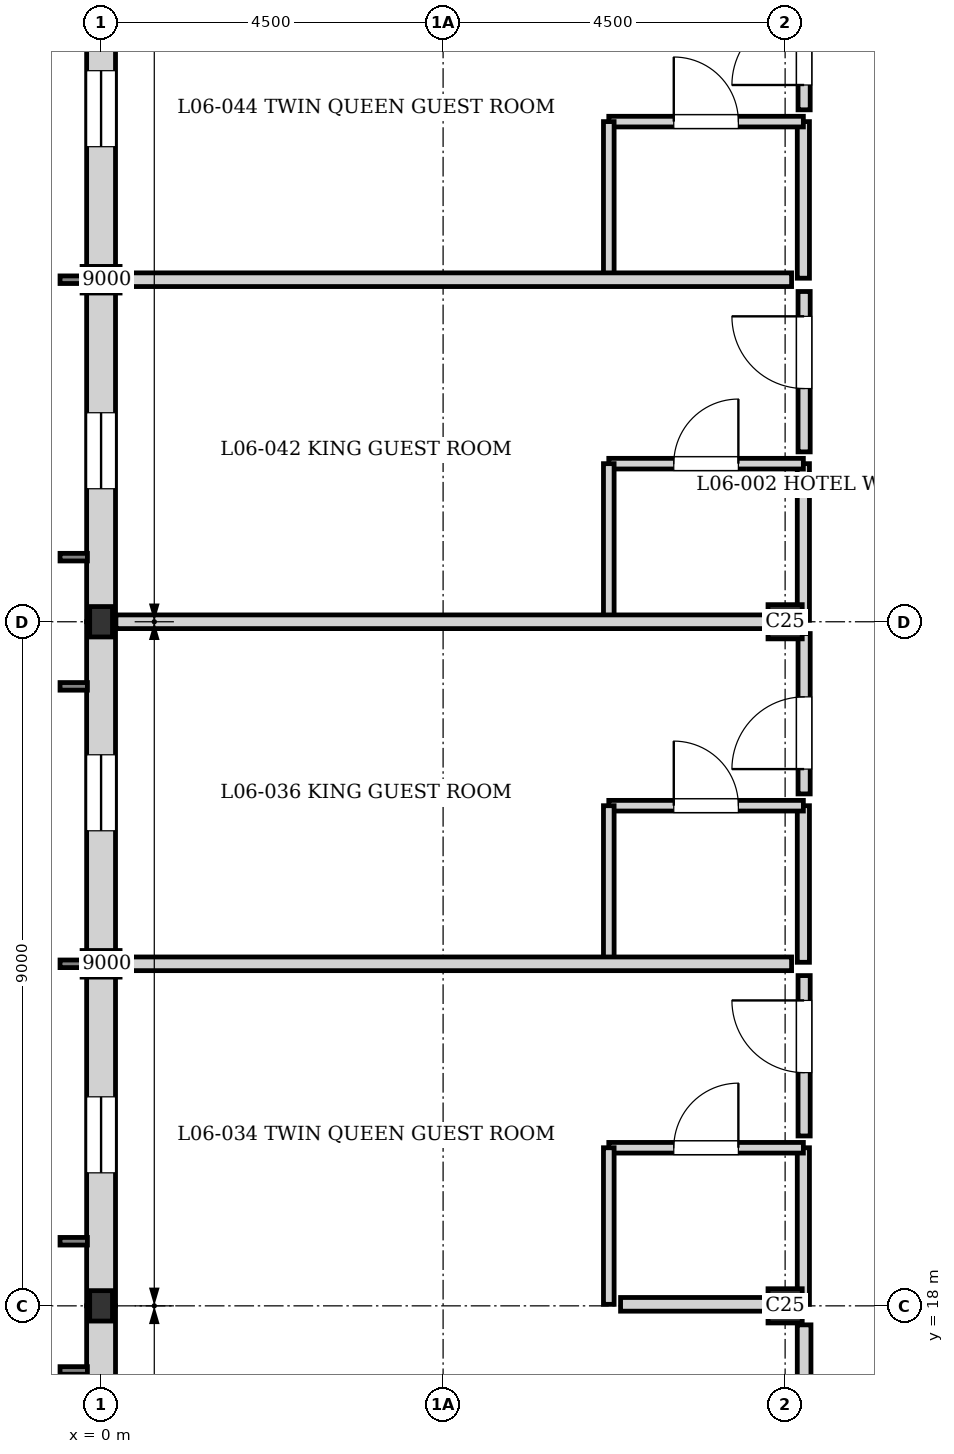
"""IFC4 building model, lengths in metres.
Left out: names, types, materials, properties, quantities, classifications, styles, units other than length and angle.
Written with IfcOpenShell. Run it as: python <this file> out.ifc"""

import sys

from ifc_helpers import new_model, si_unit, direction, frame, frame_2d, origin, origin_2d, place, context, subcontext, project, spatial, rectangle, i_section, extrude, element, fill, save


model = new_model("IFC4")
c1 = context("Model", 3, precision=1e-05, world=origin(), true_north=direction((0.0, 1.0)))
c2 = subcontext(c1, "Body", "Model", "MODEL_VIEW")
j1 = project(units=[si_unit("LENGTHUNIT", "METRE"), si_unit("PLANEANGLEUNIT", "RADIAN")], contexts=[c1])
p1 = place(None, origin())
s1 = spatial("IfcSite", under=j1, at=p1, CompositionType="ELEMENT")
p2 = place(p1, origin())
s2 = spatial("IfcBuilding", under=s1, at=p2, CompositionType="ELEMENT")
p3 = place(p2, frame((0.0, 0.0, 20.64)))
s3 = spatial("IfcBuildingStorey", under=s2, at=p3, CompositionType="ELEMENT", Elevation=20.64)
for number, where, z_axis, x_axis in (
    (1, (0.0, 18.0, 0.0), (0.0, 0.0, 1.0), (1.0, 0.0, 0.0)),
    (2, (0.0, 27.0, 0.0), (0.0, 0.0, 1.0), (1.0, 0.0, 0.0)),
):
    element("IfcColumn", number, at=place(p3, frame(where, z_axis=z_axis, x_axis=x_axis)), inside=s3, PredefinedType="COLUMN", context=c2, shape_type="SweptSolid", body=[
        extrude(i_section(OverallWidth=0.3, OverallDepth=0.4, WebThickness=0.013, FlangeThickness=0.024, at=origin_2d()), origin(), (0.0, 0.0, 1.0), 3.04),
    ])
for number, where, z_axis, x_axis in (
    (3, (9.0, 18.0, 0.0), (0.0, 0.0, 1.0), (1.0, 0.0, 0.0)),
    (4, (9.0, 27.0, 0.0), (0.0, 0.0, 1.0), (1.0, 0.0, 0.0)),
):
    element("IfcColumn", number, at=place(p3, frame(where, z_axis=z_axis, x_axis=x_axis)), inside=s3, PredefinedType="COLUMN", context=c2, shape_type="SweptSolid", body=[
        extrude(rectangle(XDim=0.45, YDim=0.45, at=origin_2d()), origin(), (0.0, 0.0, 1.0), 3.04),
    ])
for number, where, z_axis, x_axis in (
    (5, (0.0, 22.5, 0.0), (0.0, 0.0, 1.0), (0.0, 1.0, 0.0)),
    (6, (0.0, 31.5, 0.0), (0.0, 0.0, 1.0), (0.0, 1.0, 0.0)),
):
    element("IfcColumn", number, at=place(p3, frame(where, z_axis=z_axis, x_axis=x_axis)), inside=s3, PredefinedType="PILASTER", context=c2, shape_type="SweptSolid", body=[
        extrude(rectangle(XDim=0.35, YDim=0.5, at=origin_2d()), origin(), (0.0, 0.0, 1.0), 3.04),
    ])
p4 = place(p3, frame((0.0, 9.0, 0.0), z_axis=(0.0, 0.0, 1.0), x_axis=(0.0, 1.0, 0.0)))
e7 = element("IfcWall", 7, at=p4, inside=s3, PredefinedType="SOLIDWALL", context=c2, shape_type="SweptSolid", body=[
    extrude(rectangle(XDim=9.0, YDim=0.38, at=frame_2d((4.5, 0.0))), origin(), (0.0, 0.0, 1.0), 2.42),
])
p5 = place(p4, frame((1.75, 0.0, 0.35)))
e8 = element("IfcOpeningElement", 8, at=p5, cuts=e7, PredefinedType="OPENING", context=c2, shape_type="SweptSolid", body=[
    extrude(rectangle(XDim=1.0, YDim=1.6, at=frame_2d((0.5, 0.8))), frame((0.0, 0.2, 0.0), z_axis=(0.0, -1.0, 0.0), x_axis=(1.0, 0.0, 0.0)), (0.0, 0.0, 1.0), 0.4),
])
p6 = place(p4, frame((6.25, 0.0, 0.35)))
e9 = element("IfcOpeningElement", 9, at=p6, cuts=e7, PredefinedType="OPENING", context=c2, shape_type="SweptSolid", body=[
    extrude(rectangle(XDim=1.0, YDim=1.6, at=frame_2d((0.5, 0.8))), frame((0.0, 0.2, 0.0), z_axis=(0.0, -1.0, 0.0), x_axis=(1.0, 0.0, 0.0)), (0.0, 0.0, 1.0), 0.4),
])
p7 = place(p3, frame((0.0, 18.0, 0.0), z_axis=(0.0, 0.0, 1.0), x_axis=(0.0, 1.0, 0.0)))
e10 = element("IfcWall", 10, at=p7, inside=s3, PredefinedType="SOLIDWALL", context=c2, shape_type="SweptSolid", body=[
    extrude(rectangle(XDim=9.0, YDim=0.38, at=frame_2d((4.5, 0.0))), origin(), (0.0, 0.0, 1.0), 2.38),
])
p8 = place(p7, frame((1.75, 0.0, 0.35)))
e11 = element("IfcOpeningElement", 11, at=p8, cuts=e10, PredefinedType="OPENING", context=c2, shape_type="SweptSolid", body=[
    extrude(rectangle(XDim=1.0, YDim=1.6, at=frame_2d((0.5, 0.8))), frame((0.0, 0.2, 0.0), z_axis=(0.0, -1.0, 0.0), x_axis=(1.0, 0.0, 0.0)), (0.0, 0.0, 1.0), 0.4),
])
p9 = place(p7, frame((6.25, 0.0, 0.35)))
e12 = element("IfcOpeningElement", 12, at=p9, cuts=e10, PredefinedType="OPENING", context=c2, shape_type="SweptSolid", body=[
    extrude(rectangle(XDim=1.0, YDim=1.6, at=frame_2d((0.5, 0.8))), frame((0.0, 0.2, 0.0), z_axis=(0.0, -1.0, 0.0), x_axis=(1.0, 0.0, 0.0)), (0.0, 0.0, 1.0), 0.4),
])
p10 = place(p3, frame((0.0, 27.0, 0.0), z_axis=(0.0, 0.0, 1.0), x_axis=(0.0, 1.0, 0.0)))
e13 = element("IfcWall", 13, at=p10, inside=s3, PredefinedType="SOLIDWALL", context=c2, shape_type="SweptSolid", body=[
    extrude(rectangle(XDim=8.87, YDim=0.38, at=frame_2d((4.435, 0.0))), origin(), (0.0, 0.0, 1.0), 2.82),
])
p11 = place(p10, frame((1.75, 0.0, 0.35)))
e14 = element("IfcOpeningElement", 14, at=p11, cuts=e13, PredefinedType="OPENING", context=c2, shape_type="SweptSolid", body=[
    extrude(rectangle(XDim=1.0, YDim=1.6, at=frame_2d((0.5, 0.8))), frame((0.0, 0.2, 0.0), z_axis=(0.0, -1.0, 0.0), x_axis=(1.0, 0.0, 0.0)), (0.0, 0.0, 1.0), 0.4),
])
p12 = place(p10, frame((6.25, 0.0, 0.35)))
e15 = element("IfcOpeningElement", 15, at=p12, cuts=e13, PredefinedType="OPENING", context=c2, shape_type="SweptSolid", body=[
    extrude(rectangle(XDim=1.0, YDim=1.6, at=frame_2d((0.5, 0.8))), frame((0.0, 0.2, 0.0), z_axis=(0.0, -1.0, 0.0), x_axis=(1.0, 0.0, 0.0)), (0.0, 0.0, 1.0), 0.4),
])
p13 = place(p3, frame((9.24, 18.02, 0.0), z_axis=(0.0, 0.0, 1.0), x_axis=(0.0, 1.0, 0.0)))
e16 = element("IfcWall", 16, at=p13, inside=s3, PredefinedType="PARTITIONING", context=c2, shape_type="SweptSolid", body=[
    extrude(rectangle(XDim=2.06, YDim=0.16, at=frame_2d((1.03, 0.0))), origin(), (0.0, 0.0, 1.0), 2.82),
])
p14 = place(p3, frame((6.68, 20.08, 0.0), z_axis=(0.0, 0.0, 1.0), x_axis=(1.0, 0.0, 0.0)))
e17 = element("IfcWall", 17, at=p14, inside=s3, PredefinedType="PLUMBINGWALL", context=c2, shape_type="SweptSolid", body=[
    extrude(rectangle(XDim=2.56, YDim=0.14, at=frame_2d((1.28, 0.0))), origin(), (0.0, 0.0, 1.0), 2.82),
])
p15 = place(p14, frame((0.855, 0.0, 0.0)))
e18 = element("IfcOpeningElement", 18, at=p15, cuts=e17, PredefinedType="OPENING", context=c2, shape_type="SweptSolid", body=[
    extrude(rectangle(XDim=0.85, YDim=2.04, at=frame_2d((0.425, 1.02))), frame((0.0, 0.08, 0.0), z_axis=(0.0, -1.0, 0.0), x_axis=(1.0, 0.0, 0.0)), (0.0, 0.0, 1.0), 0.16),
])
p16 = place(p3, frame((6.68, 18.02, 0.0), z_axis=(0.0, 0.0, 1.0), x_axis=(0.0, 1.0, 0.0)))
e19 = element("IfcWall", 19, at=p16, inside=s3, PredefinedType="PLUMBINGWALL", context=c2, shape_type="SweptSolid", body=[
    extrude(rectangle(XDim=2.06, YDim=0.14, at=frame_2d((1.03, 0.0))), origin(), (0.0, 0.0, 1.0), 2.82),
])
p17 = place(p3, frame((9.24, 22.52, 0.0), z_axis=(0.0, 0.0, 1.0), x_axis=(0.0, 1.0, 0.0)))
e20 = element("IfcWall", 20, at=p17, inside=s3, PredefinedType="PARTITIONING", context=c2, shape_type="SweptSolid", body=[
    extrude(rectangle(XDim=2.06, YDim=0.16, at=frame_2d((1.03, 0.0))), origin(), (0.0, 0.0, 1.0), 2.82),
])
p18 = place(p3, frame((6.68, 24.58, 0.0), z_axis=(0.0, 0.0, 1.0), x_axis=(1.0, 0.0, 0.0)))
e21 = element("IfcWall", 21, at=p18, inside=s3, PredefinedType="PLUMBINGWALL", context=c2, shape_type="SweptSolid", body=[
    extrude(rectangle(XDim=2.56, YDim=0.14, at=frame_2d((1.28, 0.0))), origin(), (0.0, 0.0, 1.0), 2.82),
])
p19 = place(p18, frame((0.855, 0.0, 0.0)))
e22 = element("IfcOpeningElement", 22, at=p19, cuts=e21, PredefinedType="OPENING", context=c2, shape_type="SweptSolid", body=[
    extrude(rectangle(XDim=0.85, YDim=2.04, at=frame_2d((0.425, 1.02))), frame((0.0, 0.08, 0.0), z_axis=(0.0, -1.0, 0.0), x_axis=(1.0, 0.0, 0.0)), (0.0, 0.0, 1.0), 0.16),
])
p20 = place(p3, frame((6.68, 22.52, 0.0), z_axis=(0.0, 0.0, 1.0), x_axis=(0.0, 1.0, 0.0)))
e23 = element("IfcWall", 23, at=p20, inside=s3, PredefinedType="PLUMBINGWALL", context=c2, shape_type="SweptSolid", body=[
    extrude(rectangle(XDim=2.06, YDim=0.14, at=frame_2d((1.03, 0.0))), origin(), (0.0, 0.0, 1.0), 2.82),
])
p21 = place(p3, frame((9.24, 27.02, 0.0), z_axis=(0.0, 0.0, 1.0), x_axis=(0.0, 1.0, 0.0)))
e24 = element("IfcWall", 24, at=p21, inside=s3, PredefinedType="PARTITIONING", context=c2, shape_type="SweptSolid", body=[
    extrude(rectangle(XDim=2.06, YDim=0.16, at=frame_2d((1.03, 0.0))), origin(), (0.0, 0.0, 1.0), 2.82),
])
p22 = place(p3, frame((6.68, 29.08, 0.0), z_axis=(0.0, 0.0, 1.0), x_axis=(1.0, 0.0, 0.0)))
e25 = element("IfcWall", 25, at=p22, inside=s3, PredefinedType="PLUMBINGWALL", context=c2, shape_type="SweptSolid", body=[
    extrude(rectangle(XDim=2.56, YDim=0.14, at=frame_2d((1.28, 0.0))), origin(), (0.0, 0.0, 1.0), 2.82),
])
p23 = place(p22, frame((0.855, 0.0, 0.0)))
e26 = element("IfcOpeningElement", 26, at=p23, cuts=e25, PredefinedType="OPENING", context=c2, shape_type="SweptSolid", body=[
    extrude(rectangle(XDim=0.85, YDim=2.04, at=frame_2d((0.425, 1.02))), frame((0.0, 0.08, 0.0), z_axis=(0.0, -1.0, 0.0), x_axis=(1.0, 0.0, 0.0)), (0.0, 0.0, 1.0), 0.16),
])
p24 = place(p3, frame((6.68, 27.02, 0.0), z_axis=(0.0, 0.0, 1.0), x_axis=(0.0, 1.0, 0.0)))
e27 = element("IfcWall", 27, at=p24, inside=s3, PredefinedType="PLUMBINGWALL", context=c2, shape_type="SweptSolid", body=[
    extrude(rectangle(XDim=2.06, YDim=0.14, at=frame_2d((1.03, 0.0))), origin(), (0.0, 0.0, 1.0), 2.82),
])
p25 = place(p3, frame((9.24, 31.52, 0.0), z_axis=(0.0, 0.0, 1.0), x_axis=(0.0, 1.0, 0.0)))
e28 = element("IfcWall", 28, at=p25, inside=s3, PredefinedType="PARTITIONING", context=c2, shape_type="SweptSolid", body=[
    extrude(rectangle(XDim=2.06, YDim=0.16, at=frame_2d((1.03, 0.0))), origin(), (0.0, 0.0, 1.0), 2.82),
])
p26 = place(p3, frame((6.68, 33.58, 0.0), z_axis=(0.0, 0.0, 1.0), x_axis=(1.0, 0.0, 0.0)))
e29 = element("IfcWall", 29, at=p26, inside=s3, PredefinedType="PLUMBINGWALL", context=c2, shape_type="SweptSolid", body=[
    extrude(rectangle(XDim=2.56, YDim=0.14, at=frame_2d((1.28, 0.0))), origin(), (0.0, 0.0, 1.0), 2.82),
])
p27 = place(p26, frame((0.855, 0.0, 0.0)))
e30 = element("IfcOpeningElement", 30, at=p27, cuts=e29, PredefinedType="OPENING", context=c2, shape_type="SweptSolid", body=[
    extrude(rectangle(XDim=0.85, YDim=2.04, at=frame_2d((0.425, 1.02))), frame((0.0, 0.08, 0.0), z_axis=(0.0, -1.0, 0.0), x_axis=(1.0, 0.0, 0.0)), (0.0, 0.0, 1.0), 0.16),
])
p28 = place(p3, frame((6.68, 31.52, 0.0), z_axis=(0.0, 0.0, 1.0), x_axis=(0.0, 1.0, 0.0)))
e31 = element("IfcWall", 31, at=p28, inside=s3, PredefinedType="PLUMBINGWALL", context=c2, shape_type="SweptSolid", body=[
    extrude(rectangle(XDim=2.06, YDim=0.14, at=frame_2d((1.03, 0.0))), origin(), (0.0, 0.0, 1.0), 2.82),
])
p29 = place(p3, frame((9.25, 11.45, 0.0), z_axis=(0.0, 0.0, 1.0), x_axis=(0.0, 1.0, 0.0)))
e32 = element("IfcWall", 32, at=p29, inside=s3, PredefinedType="PARTITIONING", context=c2, shape_type="SweptSolid", body=[
    extrude(rectangle(XDim=6.3, YDim=0.18, at=frame_2d((3.15, 0.0))), origin(), (0.0, 0.0, 1.0), 2.82),
])
p30 = place(p3, frame((0.195, 22.5, 0.0), z_axis=(0.0, 0.0, 1.0), x_axis=(1.0, 0.0, 0.0)))
e33 = element("IfcWall", 33, at=p30, inside=s3, PredefinedType="PARTITIONING", context=c2, shape_type="SweptSolid", body=[
    extrude(rectangle(XDim=8.89, YDim=0.18, at=frame_2d((4.445, 0.0))), origin(), (0.0, 0.0, 1.0), 2.82),
])
p31 = place(p3, frame((0.195, 27.0, 0.0), z_axis=(0.0, 0.0, 1.0), x_axis=(1.0, 0.0, 0.0)))
e34 = element("IfcWall", 34, at=p31, inside=s3, PredefinedType="PARTITIONING", context=c2, shape_type="SweptSolid", body=[
    extrude(rectangle(XDim=8.89, YDim=0.18, at=frame_2d((4.445, 0.0))), origin(), (0.0, 0.0, 1.0), 2.29),
])
p32 = place(p3, frame((0.195, 31.5, 0.0), z_axis=(0.0, 0.0, 1.0), x_axis=(1.0, 0.0, 0.0)))
e35 = element("IfcWall", 35, at=p32, inside=s3, PredefinedType="PARTITIONING", context=c2, shape_type="SweptSolid", body=[
    extrude(rectangle(XDim=8.89, YDim=0.18, at=frame_2d((4.445, 0.0))), origin(), (0.0, 0.0, 1.0), 2.82),
])
p33 = place(p3, frame((6.835, 18.02, 0.0), z_axis=(0.0, 0.0, 1.0), x_axis=(1.0, 0.0, 0.0)))
e36 = element("IfcWall", 36, at=p33, inside=s3, PredefinedType="PARTITIONING", context=c2, shape_type="SweptSolid", body=[
    extrude(rectangle(XDim=2.26, YDim=0.18, at=frame_2d((1.13, 0.0))), origin(), (0.0, 0.0, 1.0), 2.55),
])
p34 = place(p3, frame((9.25, 20.235, 0.0), z_axis=(0.0, 0.0, 1.0), x_axis=(0.0, 1.0, 0.0)))
e37 = element("IfcWall", 37, at=p34, inside=s3, PredefinedType="PARTITIONING", context=c2, shape_type="SweptSolid", body=[
    extrude(rectangle(XDim=2.11, YDim=0.16, at=frame_2d((1.055, 0.0))), origin(), (0.0, 0.0, 1.0), 2.82),
])
p35 = place(p34, frame((0.833, 0.0, 0.0)))
e38 = element("IfcOpeningElement", 38, at=p35, cuts=e37, PredefinedType="OPENING", context=c2, shape_type="SweptSolid", body=[
    extrude(rectangle(XDim=0.95, YDim=2.15, at=frame_2d((0.475, 1.075))), frame((0.0, 0.09, 0.0), z_axis=(0.0, -1.0, 0.0), x_axis=(1.0, 0.0, 0.0)), (0.0, 0.0, 1.0), 0.18),
])
p36 = place(p3, frame((9.25, 24.735, 0.0), z_axis=(0.0, 0.0, 1.0), x_axis=(0.0, 1.0, 0.0)))
e39 = element("IfcWall", 39, at=p36, inside=s3, PredefinedType="PARTITIONING", context=c2, shape_type="SweptSolid", body=[
    extrude(rectangle(XDim=2.11, YDim=0.16, at=frame_2d((1.055, 0.0))), origin(), (0.0, 0.0, 1.0), 2.82),
])
p37 = place(p36, frame((0.327, 0.0, 0.0)))
e40 = element("IfcOpeningElement", 40, at=p37, cuts=e39, PredefinedType="OPENING", context=c2, shape_type="SweptSolid", body=[
    extrude(rectangle(XDim=0.95, YDim=2.15, at=frame_2d((0.475, 1.075))), frame((0.0, 0.09, 0.0), z_axis=(0.0, -1.0, 0.0), x_axis=(1.0, 0.0, 0.0)), (0.0, 0.0, 1.0), 0.18),
])
p38 = place(p3, frame((9.25, 29.235, 0.0), z_axis=(0.0, 0.0, 1.0), x_axis=(0.0, 1.0, 0.0)))
e41 = element("IfcWall", 41, at=p38, inside=s3, PredefinedType="PARTITIONING", context=c2, shape_type="SweptSolid", body=[
    extrude(rectangle(XDim=2.11, YDim=0.16, at=frame_2d((1.055, 0.0))), origin(), (0.0, 0.0, 1.0), 2.82),
])
p39 = place(p38, frame((0.833, 0.0, 0.0)))
e42 = element("IfcOpeningElement", 42, at=p39, cuts=e41, PredefinedType="OPENING", context=c2, shape_type="SweptSolid", body=[
    extrude(rectangle(XDim=0.95, YDim=2.15, at=frame_2d((0.475, 1.075))), frame((0.0, 0.09, 0.0), z_axis=(0.0, -1.0, 0.0), x_axis=(1.0, 0.0, 0.0)), (0.0, 0.0, 1.0), 0.18),
])
p40 = place(p3, frame((9.25, 33.735, 0.0), z_axis=(0.0, 0.0, 1.0), x_axis=(0.0, 1.0, 0.0)))
e43 = element("IfcWall", 43, at=p40, inside=s3, PredefinedType="PARTITIONING", context=c2, shape_type="SweptSolid", body=[
    extrude(rectangle(XDim=2.11, YDim=0.16, at=frame_2d((1.055, 0.0))), origin(), (0.0, 0.0, 1.0), 2.82),
])
p41 = place(p40, frame((0.327, 0.0, 0.0)))
e44 = element("IfcOpeningElement", 44, at=p41, cuts=e43, PredefinedType="OPENING", context=c2, shape_type="SweptSolid", body=[
    extrude(rectangle(XDim=0.95, YDim=2.15, at=frame_2d((0.475, 1.075))), frame((0.0, 0.09, 0.0), z_axis=(0.0, -1.0, 0.0), x_axis=(1.0, 0.0, 0.0)), (0.0, 0.0, 1.0), 0.18),
])
p42 = place(p8, origin())
e45 = element("IfcWindow", 45, at=p42, inside=s3, PartitioningType="SINGLE_PANEL", PredefinedType="WINDOW", context=c2, shape_type="SweptSolid", body=[
    extrude(rectangle(XDim=1.0, YDim=1.6, at=frame_2d((0.5, 0.8))), frame((0.0, 0.03, 0.0), z_axis=(0.0, -1.0, 0.0), x_axis=(1.0, 0.0, 0.0)), (0.0, 0.0, 1.0), 0.06),
])
fill(e11, e45)
p43 = place(p9, origin())
e46 = element("IfcWindow", 46, at=p43, inside=s3, PartitioningType="SINGLE_PANEL", PredefinedType="WINDOW", context=c2, shape_type="SweptSolid", body=[
    extrude(rectangle(XDim=1.0, YDim=1.6, at=frame_2d((0.5, 0.8))), frame((0.0, 0.03, 0.0), z_axis=(0.0, -1.0, 0.0), x_axis=(1.0, 0.0, 0.0)), (0.0, 0.0, 1.0), 0.06),
])
fill(e12, e46)
p44 = place(p11, origin())
e47 = element("IfcWindow", 47, at=p44, inside=s3, PartitioningType="SINGLE_PANEL", PredefinedType="WINDOW", context=c2, shape_type="SweptSolid", body=[
    extrude(rectangle(XDim=1.0, YDim=1.6, at=frame_2d((0.5, 0.8))), frame((0.0, 0.03, 0.0), z_axis=(0.0, -1.0, 0.0), x_axis=(1.0, 0.0, 0.0)), (0.0, 0.0, 1.0), 0.06),
])
fill(e14, e47)
p45 = place(p12, origin())
e48 = element("IfcWindow", 48, at=p45, inside=s3, PartitioningType="SINGLE_PANEL", PredefinedType="WINDOW", context=c2, shape_type="SweptSolid", body=[
    extrude(rectangle(XDim=1.0, YDim=1.6, at=frame_2d((0.5, 0.8))), frame((0.0, 0.03, 0.0), z_axis=(0.0, -1.0, 0.0), x_axis=(1.0, 0.0, 0.0)), (0.0, 0.0, 1.0), 0.06),
])
fill(e15, e48)
p46 = place(p15, origin())
e49 = element("IfcDoor", 49, at=p46, inside=s3, OperationType="SINGLE_SWING_RIGHT", PredefinedType="DOOR", context=c2, shape_type="SweptSolid", body=[
    extrude(rectangle(XDim=0.85, YDim=2.04, at=frame_2d((0.425, 1.02))), frame((0.0, 0.025, 0.0), z_axis=(0.0, -1.0, 0.0), x_axis=(1.0, 0.0, 0.0)), (0.0, 0.0, 1.0), 0.05),
])
fill(e18, e49)
p47 = place(p19, origin())
e50 = element("IfcDoor", 50, at=p47, inside=s3, OperationType="SINGLE_SWING_LEFT", PredefinedType="DOOR", context=c2, shape_type="SweptSolid", body=[
    extrude(rectangle(XDim=0.85, YDim=2.04, at=frame_2d((0.425, 1.02))), frame((0.0, 0.025, 0.0), z_axis=(0.0, -1.0, 0.0), x_axis=(1.0, 0.0, 0.0)), (0.0, 0.0, 1.0), 0.05),
])
fill(e22, e50)
p48 = place(p23, origin())
e51 = element("IfcDoor", 51, at=p48, inside=s3, OperationType="SINGLE_SWING_RIGHT", PredefinedType="DOOR", context=c2, shape_type="SweptSolid", body=[
    extrude(rectangle(XDim=0.85, YDim=2.04, at=frame_2d((0.425, 1.02))), frame((0.0, 0.025, 0.0), z_axis=(0.0, -1.0, 0.0), x_axis=(1.0, 0.0, 0.0)), (0.0, 0.0, 1.0), 0.05),
])
fill(e26, e51)
p49 = place(p27, origin())
e52 = element("IfcDoor", 52, at=p49, inside=s3, OperationType="SINGLE_SWING_LEFT", PredefinedType="DOOR", context=c2, shape_type="SweptSolid", body=[
    extrude(rectangle(XDim=0.85, YDim=2.04, at=frame_2d((0.425, 1.02))), frame((0.0, 0.025, 0.0), z_axis=(0.0, -1.0, 0.0), x_axis=(1.0, 0.0, 0.0)), (0.0, 0.0, 1.0), 0.05),
])
fill(e30, e52)
p50 = place(p35, origin())
e53 = element("IfcDoor", 53, at=p50, inside=s3, OperationType="SINGLE_SWING_RIGHT", PredefinedType="DOOR", context=c2, shape_type="SweptSolid", body=[
    extrude(rectangle(XDim=0.95, YDim=2.15, at=frame_2d((0.475, 1.075))), frame((0.0, 0.025, 0.0), z_axis=(0.0, -1.0, 0.0), x_axis=(1.0, 0.0, 0.0)), (0.0, 0.0, 1.0), 0.05),
])
fill(e38, e53)
p51 = place(p37, origin())
e54 = element("IfcDoor", 54, at=p51, inside=s3, OperationType="SINGLE_SWING_LEFT", PredefinedType="DOOR", context=c2, shape_type="SweptSolid", body=[
    extrude(rectangle(XDim=0.95, YDim=2.15, at=frame_2d((0.475, 1.075))), frame((0.0, 0.025, 0.0), z_axis=(0.0, -1.0, 0.0), x_axis=(1.0, 0.0, 0.0)), (0.0, 0.0, 1.0), 0.05),
])
fill(e40, e54)
p52 = place(p39, origin())
e55 = element("IfcDoor", 55, at=p52, inside=s3, OperationType="SINGLE_SWING_RIGHT", PredefinedType="DOOR", context=c2, shape_type="SweptSolid", body=[
    extrude(rectangle(XDim=0.95, YDim=2.15, at=frame_2d((0.475, 1.075))), frame((0.0, 0.025, 0.0), z_axis=(0.0, -1.0, 0.0), x_axis=(1.0, 0.0, 0.0)), (0.0, 0.0, 1.0), 0.05),
])
fill(e42, e55)
p53 = place(p41, origin())
e56 = element("IfcDoor", 56, at=p53, inside=s3, OperationType="SINGLE_SWING_LEFT", PredefinedType="DOOR", context=c2, shape_type="SweptSolid", body=[
    extrude(rectangle(XDim=0.95, YDim=2.15, at=frame_2d((0.475, 1.075))), frame((0.0, 0.025, 0.0), z_axis=(0.0, -1.0, 0.0), x_axis=(1.0, 0.0, 0.0)), (0.0, 0.0, 1.0), 0.05),
])
fill(e44, e56)
save(model, sys.argv[1])
